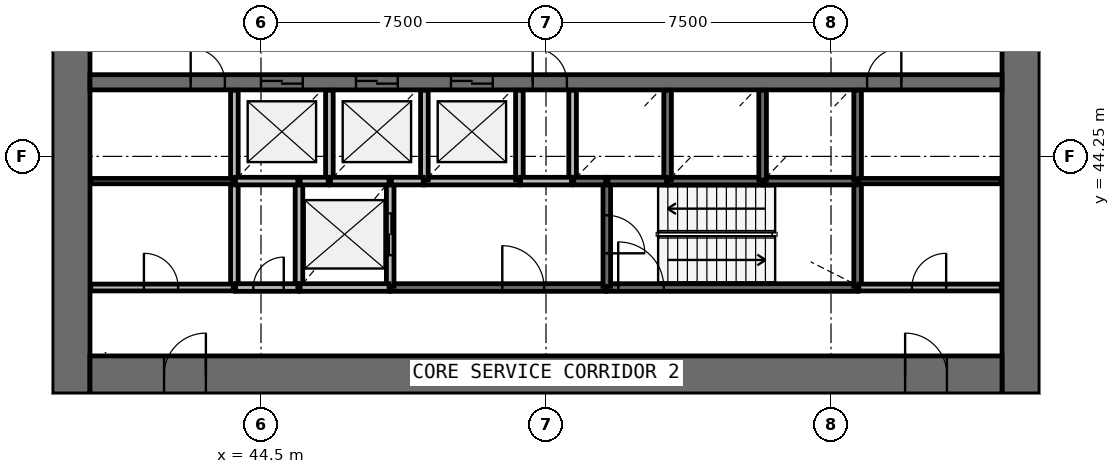
"""IFC4 building model, lengths in metres.
Left out: names, types, materials, properties, quantities, classifications, styles, units other than length and angle.
Written with IfcOpenShell. Run it as: python <this file> out.ifc"""

import sys

from ifc_helpers import new_model, si_unit, direction, frame, frame_2d, origin, place, context, subcontext, project, spatial, rectangle, extrude, source, transform, mapped, element, fill, save


model = new_model("IFC4")
c1 = context("Model", 3, precision=1e-05, world=origin(), true_north=direction((0.0, 1.0)))
c2 = subcontext(c1, "Body", "Model", "MODEL_VIEW")
j1 = project(units=[si_unit("LENGTHUNIT", "METRE"), si_unit("PLANEANGLEUNIT", "RADIAN")], contexts=[c1])
p1 = place(None, origin())
s1 = spatial("IfcSite", under=j1, at=p1, CompositionType="ELEMENT")
p2 = place(p1, origin())
s2 = spatial("IfcBuilding", under=s1, at=p2, CompositionType="ELEMENT")
p3 = place(p2, frame((0.0, 0.0, 44.6)))
s3 = spatial("IfcBuildingStorey", under=s2, at=p3, CompositionType="ELEMENT", Elevation=44.6)
p4 = place(p3, frame((64.5, 38.0, 0.0), z_axis=(0.0, 0.0, 1.0), x_axis=(0.0, 1.0, 0.0)))
e1 = element("IfcWall", 1, at=p4, inside=s3, PredefinedType="SHEAR", context=c2, shape_type="SweptSolid", body=[
    extrude(rectangle(XDim=20.0, YDim=1.0, at=frame_2d((10.0, 0.0))), origin(), (0.0, 0.0, 1.0), 4.4),
])
p5 = place(p4, frame((9.1, 0.0, 0.0)))
e2 = element("IfcOpeningElement", 2, at=p5, cuts=e1, PredefinedType="OPENING", context=c2, shape_type="SweptSolid", body=[
    extrude(rectangle(XDim=1.8, YDim=2.1, at=frame_2d((0.9, 1.05))), frame((0.0, 0.51, 0.0), z_axis=(0.0, -1.0, 0.0), x_axis=(1.0, 0.0, 0.0)), (0.0, 0.0, 1.0), 1.02),
])
p6 = place(p3, frame((39.5, 58.0, 0.0), z_axis=(0.0, 0.0, 1.0), x_axis=(0.0, -1.0, 0.0)))
e3 = element("IfcWall", 3, at=p6, inside=s3, PredefinedType="SHEAR", context=c2, shape_type="SweptSolid", body=[
    extrude(rectangle(XDim=20.0, YDim=1.0, at=frame_2d((10.0, 0.0))), origin(), (0.0, 0.0, 1.0), 4.4),
])
p7 = place(p6, frame((9.1, 0.0, 0.0)))
e4 = element("IfcOpeningElement", 4, at=p7, cuts=e3, PredefinedType="OPENING", context=c2, shape_type="SweptSolid", body=[
    extrude(rectangle(XDim=1.8, YDim=2.1, at=frame_2d((0.9, 1.05))), frame((0.0, 0.51, 0.0), z_axis=(0.0, -1.0, 0.0), x_axis=(1.0, 0.0, 0.0)), (0.0, 0.0, 1.0), 1.02),
])
p8 = place(p3, frame((40.0, 38.5, 0.0), z_axis=(0.0, 0.0, 1.0), x_axis=(1.0, 0.0, 0.0)))
e5 = element("IfcWall", 5, at=p8, inside=s3, PredefinedType="SHEAR", context=c2, shape_type="SweptSolid", body=[
    extrude(rectangle(XDim=24.0, YDim=1.0, at=frame_2d((12.0, 0.0))), origin(), (0.0, 0.0, 1.0), 4.4),
])
p9 = place(p8, frame((21.45, 0.0, 0.0)))
e6 = element("IfcOpeningElement", 6, at=p9, cuts=e5, PredefinedType="OPENING", context=c2, shape_type="SweptSolid", body=[
    extrude(rectangle(XDim=1.1, YDim=2.1, at=frame_2d((0.55, 1.05))), frame((0.0, 0.51, 0.0), z_axis=(0.0, -1.0, 0.0), x_axis=(1.0, 0.0, 0.0)), (0.0, 0.0, 1.0), 1.02),
])
p10 = place(p8, frame((1.95, 0.0, 0.0)))
e7 = element("IfcOpeningElement", 7, at=p10, cuts=e5, PredefinedType="OPENING", context=c2, shape_type="SweptSolid", body=[
    extrude(rectangle(XDim=1.1, YDim=2.1, at=frame_2d((0.55, 1.05))), frame((0.0, 0.51, 0.0), z_axis=(0.0, -1.0, 0.0), x_axis=(1.0, 0.0, 0.0)), (0.0, 0.0, 1.0), 1.02),
])
p11 = place(p3, frame((40.0, 46.2, 0.0), z_axis=(0.0, 0.0, 1.0), x_axis=(1.0, 0.0, 0.0)))
e8 = element("IfcWall", 8, at=p11, inside=s3, PredefinedType="SHEAR", context=c2, shape_type="SweptSolid", body=[
    extrude(rectangle(XDim=24.0, YDim=0.4, at=frame_2d((12.0, 0.0))), origin(), (0.0, 0.0, 1.0), 4.4),
])
p12 = place(p11, frame((4.5, 0.0, 0.0)))
e9 = element("IfcOpeningElement", 9, at=p12, cuts=e8, PredefinedType="OPENING", context=c2, shape_type="SweptSolid", body=[
    extrude(rectangle(XDim=1.1, YDim=2.1, at=frame_2d((0.55, 1.05))), frame((0.0, 0.21, 0.0), z_axis=(0.0, -1.0, 0.0), x_axis=(1.0, 0.0, 0.0)), (0.0, 0.0, 1.0), 0.42),
])
p13 = place(p11, frame((7.0, 0.0, 0.0)))
e10 = element("IfcOpeningElement", 10, at=p13, cuts=e8, PredefinedType="OPENING", context=c2, shape_type="SweptSolid", body=[
    extrude(rectangle(XDim=1.1, YDim=2.1, at=frame_2d((0.55, 1.05))), frame((0.0, 0.21, 0.0), z_axis=(0.0, -1.0, 0.0), x_axis=(1.0, 0.0, 0.0)), (0.0, 0.0, 1.0), 0.42),
])
p14 = place(p11, frame((9.5, 0.0, 0.0)))
e11 = element("IfcOpeningElement", 11, at=p14, cuts=e8, PredefinedType="OPENING", context=c2, shape_type="SweptSolid", body=[
    extrude(rectangle(XDim=1.1, YDim=2.1, at=frame_2d((0.55, 1.05))), frame((0.0, 0.21, 0.0), z_axis=(0.0, -1.0, 0.0), x_axis=(1.0, 0.0, 0.0)), (0.0, 0.0, 1.0), 0.42),
])
p15 = place(p11, frame((20.45, 0.0, 0.0)))
e12 = element("IfcOpeningElement", 12, at=p15, cuts=e8, PredefinedType="OPENING", context=c2, shape_type="SweptSolid", body=[
    extrude(rectangle(XDim=0.9, YDim=2.1, at=frame_2d((0.45, 1.05))), frame((0.0, 0.21, 0.0), z_axis=(0.0, -1.0, 0.0), x_axis=(1.0, 0.0, 0.0)), (0.0, 0.0, 1.0), 0.42),
])
p16 = place(p11, frame((2.65, 0.0, 0.0)))
e13 = element("IfcOpeningElement", 13, at=p16, cuts=e8, PredefinedType="OPENING", context=c2, shape_type="SweptSolid", body=[
    extrude(rectangle(XDim=0.9, YDim=2.1, at=frame_2d((0.45, 1.05))), frame((0.0, 0.21, 0.0), z_axis=(0.0, -1.0, 0.0), x_axis=(1.0, 0.0, 0.0)), (0.0, 0.0, 1.0), 0.42),
])
p17 = place(p11, frame((11.65, 0.0, 0.0)))
e14 = element("IfcOpeningElement", 14, at=p17, cuts=e8, PredefinedType="OPENING", context=c2, shape_type="SweptSolid", body=[
    extrude(rectangle(XDim=0.9, YDim=2.1, at=frame_2d((0.45, 1.05))), frame((0.0, 0.21, 0.0), z_axis=(0.0, -1.0, 0.0), x_axis=(1.0, 0.0, 0.0)), (0.0, 0.0, 1.0), 0.42),
])
p18 = place(p3, frame((53.6, 40.8, 0.0), z_axis=(0.0, 0.0, 1.0), x_axis=(1.0, 0.0, 0.0)))
e15 = element("IfcWall", 15, at=p18, inside=s3, PredefinedType="SOLIDWALL", context=c2, shape_type="SweptSolid", body=[
    extrude(rectangle(XDim=6.6, YDim=0.2, at=frame_2d((3.3, 0.0))), origin(), (0.0, 0.0, 1.0), 3.95),
])
p19 = place(p18, frame((0.3, 0.0, 0.0)))
e16 = element("IfcOpeningElement", 16, at=p19, cuts=e15, PredefinedType="OPENING", context=c2, shape_type="SweptSolid", body=[
    extrude(rectangle(XDim=1.2, YDim=2.1, at=frame_2d((0.6, 1.05))), frame((0.0, 0.11, 0.0), z_axis=(0.0, -1.0, 0.0), x_axis=(1.0, 0.0, 0.0)), (0.0, 0.0, 1.0), 0.22),
])
p20 = place(p3, frame((47.9, 40.8, 0.0), z_axis=(0.0, 0.0, 1.0), x_axis=(1.0, 0.0, 0.0)))
e17 = element("IfcWall", 17, at=p20, inside=s3, PredefinedType="SOLIDWALL", context=c2, shape_type="SweptSolid", body=[
    extrude(rectangle(XDim=5.67, YDim=0.2, at=frame_2d((2.835, 0.0))), origin(), (0.0, 0.0, 1.0), 3.95),
])
p21 = place(p20, frame((2.95, 0.0, 0.0)))
e18 = element("IfcOpeningElement", 18, at=p21, cuts=e17, PredefinedType="OPENING", context=c2, shape_type="SweptSolid", body=[
    extrude(rectangle(XDim=1.1, YDim=2.1, at=frame_2d((0.55, 1.05))), frame((0.0, 0.11, 0.0), z_axis=(0.0, -1.0, 0.0), x_axis=(1.0, 0.0, 0.0)), (0.0, 0.0, 1.0), 0.22),
])
for number, where, z_axis, x_axis in (
    (19, (43.8, 43.6, 0.0), (0.0, 0.0, 1.0), (0.0, -1.0, 0.0)),
    (20, (45.5, 43.6, 0.0), (0.0, 0.0, 1.0), (0.0, -1.0, 0.0)),
):
    element("IfcWall", number, at=place(p3, frame(where, z_axis=z_axis, x_axis=x_axis)), inside=s3, PredefinedType="SOLIDWALL", context=c2, shape_type="SweptSolid", body=[
        extrude(rectangle(XDim=2.8, YDim=0.2, at=frame_2d((1.4, 0.0))), origin(), (0.0, 0.0, 1.0), 3.95),
    ])
p22 = place(p3, frame((47.9, 40.83, 0.0), z_axis=(0.0, 0.0, 1.0), x_axis=(0.0, 1.0, 0.0)))
e21 = element("IfcWall", 21, at=p22, inside=s3, PredefinedType="SOLIDWALL", context=c2, shape_type="SweptSolid", body=[
    extrude(rectangle(XDim=2.77, YDim=0.2, at=frame_2d((1.385, 0.0))), origin(), (0.0, 0.0, 1.0), 3.95),
])
p23 = place(p22, frame((0.82, 0.0, 0.0)))
e22 = element("IfcOpeningElement", 22, at=p23, cuts=e21, PredefinedType="OPENING", context=c2, shape_type="SweptSolid", body=[
    extrude(rectangle(XDim=1.1, YDim=2.1, at=frame_2d((0.55, 1.05))), frame((0.0, 0.11, 0.0), z_axis=(0.0, -1.0, 0.0), x_axis=(1.0, 0.0, 0.0)), (0.0, 0.0, 1.0), 0.22),
])
p24 = place(p3, frame((60.2, 40.83, 0.0), z_axis=(0.0, 0.0, 1.0), x_axis=(0.0, 1.0, 0.0)))
e23 = element("IfcWall", 23, at=p24, inside=s3, PredefinedType="SOLIDWALL", context=c2, shape_type="SweptSolid", body=[
    extrude(rectangle(XDim=2.77, YDim=0.2, at=frame_2d((1.385, 0.0))), origin(), (0.0, 0.0, 1.0), 3.95),
])
p25 = place(p3, frame((53.6, 43.6, 0.0), z_axis=(0.0, 0.0, 1.0), x_axis=(0.0, -1.0, 0.0)))
e24 = element("IfcWall", 24, at=p25, inside=s3, PredefinedType="SOLIDWALL", context=c2, shape_type="SweptSolid", body=[
    extrude(rectangle(XDim=2.77, YDim=0.2, at=frame_2d((1.385, 0.0))), origin(), (0.0, 0.0, 1.0), 3.95),
])
p26 = place(p25, frame((0.9, 0.0, 0.0)))
e25 = element("IfcOpeningElement", 25, at=p26, cuts=e24, PredefinedType="OPENING", context=c2, shape_type="SweptSolid", body=[
    extrude(rectangle(XDim=1.0, YDim=2.1, at=frame_2d((0.5, 1.05))), frame((0.0, 0.11, 0.0), z_axis=(0.0, -1.0, 0.0), x_axis=(1.0, 0.0, 0.0)), (0.0, 0.0, 1.0), 0.22),
])
for number, where, z_axis, x_axis in (
    (26, (48.8, 43.6, 0.0), (0.0, 0.0, 1.0), (1.0, 0.0, 0.0)),
    (27, (55.2, 43.6, 0.0), (0.0, 0.0, 1.0), (1.0, 0.0, 0.0)),
):
    element("IfcWall", number, at=place(p3, frame(where, z_axis=z_axis, x_axis=x_axis)), inside=s3, PredefinedType="SOLIDWALL", context=c2, shape_type="SweptSolid", body=[
        extrude(rectangle(XDim=2.5, YDim=0.2, at=frame_2d((1.25, 0.0))), origin(), (0.0, 0.0, 1.0), 3.95),
    ])
p27 = place(p3, frame((57.73, 43.6, 0.0), z_axis=(0.0, 0.0, 1.0), x_axis=(1.0, 0.0, 0.0)))
e28 = element("IfcWall", 28, at=p27, inside=s3, PredefinedType="SOLIDWALL", context=c2, shape_type="SweptSolid", body=[
    extrude(rectangle(XDim=2.44, YDim=0.2, at=frame_2d((1.22, 0.0))), origin(), (0.0, 0.0, 1.0), 3.95),
])
p28 = place(p3, frame((45.53, 40.8, 0.0), z_axis=(0.0, 0.0, 1.0), x_axis=(1.0, 0.0, 0.0)))
e29 = element("IfcWall", 29, at=p28, inside=s3, PredefinedType="SOLIDWALL", context=c2, shape_type="SweptSolid", body=[
    extrude(rectangle(XDim=2.34, YDim=0.2, at=frame_2d((1.17, 0.0))), origin(), (0.0, 0.0, 1.0), 3.95),
])
p29 = place(p3, frame((43.8, 45.99, 0.0), z_axis=(0.0, 0.0, 1.0), x_axis=(0.0, -1.0, 0.0)))
e30 = element("IfcWall", 30, at=p29, inside=s3, PredefinedType="SOLIDWALL", context=c2, shape_type="SweptSolid", body=[
    extrude(rectangle(XDim=2.36, YDim=0.2, at=frame_2d((1.18, 0.0))), origin(), (0.0, 0.0, 1.0), 3.95),
])
p30 = place(p3, frame((46.3, 43.6, 0.0), z_axis=(0.0, 0.0, 1.0), x_axis=(0.0, 1.0, 0.0)))
e31 = element("IfcWall", 31, at=p30, inside=s3, PredefinedType="SOLIDWALL", context=c2, shape_type="SweptSolid", body=[
    extrude(rectangle(XDim=2.39, YDim=0.2, at=frame_2d((1.195, 0.0))), origin(), (0.0, 0.0, 1.0), 3.95),
])
for number, where, z_axis, x_axis in (
    (32, (48.8, 43.63, 0.0), (0.0, 0.0, 1.0), (0.0, 1.0, 0.0)),
    (33, (51.3, 43.63, 0.0), (0.0, 0.0, 1.0), (0.0, 1.0, 0.0)),
):
    element("IfcWall", number, at=place(p3, frame(where, z_axis=z_axis, x_axis=x_axis)), inside=s3, PredefinedType="SOLIDWALL", context=c2, shape_type="SweptSolid", body=[
        extrude(rectangle(XDim=2.36, YDim=0.2, at=frame_2d((1.18, 0.0))), origin(), (0.0, 0.0, 1.0), 3.95),
    ])
p31 = place(p3, frame((52.7, 45.99, 0.0), z_axis=(0.0, 0.0, 1.0), x_axis=(0.0, -1.0, 0.0)))
e34 = element("IfcWall", 34, at=p31, inside=s3, PredefinedType="SOLIDWALL", context=c2, shape_type="SweptSolid", body=[
    extrude(rectangle(XDim=2.39, YDim=0.2, at=frame_2d((1.195, 0.0))), origin(), (0.0, 0.0, 1.0), 3.95),
])
for number, where, z_axis, x_axis in (
    (35, (55.2, 43.63, 0.0), (0.0, 0.0, 1.0), (0.0, 1.0, 0.0)),
    (36, (57.7, 43.63, 0.0), (0.0, 0.0, 1.0), (0.0, 1.0, 0.0)),
    (37, (60.2, 43.63, 0.0), (0.0, 0.0, 1.0), (0.0, 1.0, 0.0)),
):
    element("IfcWall", number, at=place(p3, frame(where, z_axis=z_axis, x_axis=x_axis)), inside=s3, PredefinedType="SOLIDWALL", context=c2, shape_type="SweptSolid", body=[
        extrude(rectangle(XDim=2.36, YDim=0.2, at=frame_2d((1.18, 0.0))), origin(), (0.0, 0.0, 1.0), 3.95),
    ])
p32 = place(p3, frame((43.83, 43.6, 0.0), z_axis=(0.0, 0.0, 1.0), x_axis=(1.0, 0.0, 0.0)))
e38 = element("IfcWall", 38, at=p32, inside=s3, PredefinedType="SOLIDWALL", context=c2, shape_type="SweptSolid", body=[
    extrude(rectangle(XDim=1.64, YDim=0.2, at=frame_2d((0.82, 0.0))), origin(), (0.0, 0.0, 1.0), 3.95),
])
p33 = place(p3, frame((43.83, 40.8, 0.0), z_axis=(0.0, 0.0, 1.0), x_axis=(1.0, 0.0, 0.0)))
e39 = element("IfcWall", 39, at=p33, inside=s3, PredefinedType="SOLIDWALL", context=c2, shape_type="SweptSolid", body=[
    extrude(rectangle(XDim=1.64, YDim=0.2, at=frame_2d((0.82, 0.0))), origin(), (0.0, 0.0, 1.0), 3.95),
])
p34 = place(p33, frame((0.47, 0.0, 0.0)))
e40 = element("IfcOpeningElement", 40, at=p34, cuts=e39, PredefinedType="OPENING", context=c2, shape_type="SweptSolid", body=[
    extrude(rectangle(XDim=0.8, YDim=2.1, at=frame_2d((0.4, 1.05))), frame((0.0, 0.11, 0.0), z_axis=(0.0, -1.0, 0.0), x_axis=(1.0, 0.0, 0.0)), (0.0, 0.0, 1.0), 0.22),
])
for number, where, z_axis, x_axis in (
    (41, (46.33, 43.6, 0.0), (0.0, 0.0, 1.0), (1.0, 0.0, 0.0)),
    (42, (53.63, 43.6, 0.0), (0.0, 0.0, 1.0), (1.0, 0.0, 0.0)),
):
    element("IfcWall", number, at=place(p3, frame(where, z_axis=z_axis, x_axis=x_axis)), inside=s3, PredefinedType="SOLIDWALL", context=c2, shape_type="SweptSolid", body=[
        extrude(rectangle(XDim=1.54, YDim=0.2, at=frame_2d((0.77, 0.0))), origin(), (0.0, 0.0, 1.0), 3.95),
    ])
p35 = place(p3, frame((52.67, 43.6, 0.0), z_axis=(0.0, 0.0, 1.0), x_axis=(-1.0, 0.0, 0.0)))
e43 = element("IfcWall", 43, at=p35, inside=s3, PredefinedType="SOLIDWALL", context=c2, shape_type="SweptSolid", body=[
    extrude(rectangle(XDim=1.34, YDim=0.2, at=frame_2d((0.67, 0.0))), origin(), (0.0, 0.0, 1.0), 3.95),
])
for number, where, z_axis, x_axis in (
    (44, (47.93, 43.6, 0.0), (0.0, 0.0, 1.0), (1.0, 0.0, 0.0)),
    (45, (52.73, 43.6, 0.0), (0.0, 0.0, 1.0), (1.0, 0.0, 0.0)),
):
    element("IfcWall", number, at=place(p3, frame(where, z_axis=z_axis, x_axis=x_axis)), inside=s3, PredefinedType="SOLIDWALL", context=c2, shape_type="SweptSolid", body=[
        extrude(rectangle(XDim=0.84, YDim=0.2, at=frame_2d((0.42, 0.0))), origin(), (0.0, 0.0, 1.0), 3.95),
    ])
p36 = place(p3, frame((45.53, 43.6, 0.0), z_axis=(0.0, 0.0, 1.0), x_axis=(1.0, 0.0, 0.0)))
e46 = element("IfcWall", 46, at=p36, inside=s3, PredefinedType="SOLIDWALL", context=c2, shape_type="SweptSolid", body=[
    extrude(rectangle(XDim=0.74, YDim=0.2, at=frame_2d((0.37, 0.0))), origin(), (0.0, 0.0, 1.0), 3.95),
])
p37 = place(p3, frame((40.02, 40.8, 0.0), z_axis=(0.0, 0.0, 1.0), x_axis=(1.0, 0.0, 0.0)))
e47 = element("IfcWall", 47, at=p37, inside=s3, PredefinedType="PARTITIONING", context=c2, shape_type="SweptSolid", body=[
    extrude(rectangle(XDim=3.75, YDim=0.18, at=frame_2d((1.875, 0.0))), origin(), (0.0, 0.0, 1.0), 3.95),
])
p38 = place(p37, frame((1.4, 0.0, 0.0)))
e48 = element("IfcOpeningElement", 48, at=p38, cuts=e47, PredefinedType="OPENING", context=c2, shape_type="SweptSolid", body=[
    extrude(rectangle(XDim=0.9, YDim=2.1, at=frame_2d((0.45, 1.05))), frame((0.0, 0.1, 0.0), z_axis=(0.0, -1.0, 0.0), x_axis=(1.0, 0.0, 0.0)), (0.0, 0.0, 1.0), 0.2),
])
p39 = place(p3, frame((60.23, 40.8, 0.0), z_axis=(0.0, 0.0, 1.0), x_axis=(1.0, 0.0, 0.0)))
e49 = element("IfcWall", 49, at=p39, inside=s3, PredefinedType="PARTITIONING", context=c2, shape_type="SweptSolid", body=[
    extrude(rectangle(XDim=3.75, YDim=0.18, at=frame_2d((1.875, 0.0))), origin(), (0.0, 0.0, 1.0), 3.95),
])
p40 = place(p39, frame((1.4, 0.0, 0.0)))
e50 = element("IfcOpeningElement", 50, at=p40, cuts=e49, PredefinedType="OPENING", context=c2, shape_type="SweptSolid", body=[
    extrude(rectangle(XDim=0.9, YDim=2.1, at=frame_2d((0.45, 1.05))), frame((0.0, 0.1, 0.0), z_axis=(0.0, -1.0, 0.0), x_axis=(1.0, 0.0, 0.0)), (0.0, 0.0, 1.0), 0.2),
])
for number, where, z_axis, x_axis in (
    (51, (43.77, 43.6, 0.0), (0.0, 0.0, 1.0), (-1.0, 0.0, 0.0)),
    (52, (60.23, 43.6, 0.0), (0.0, 0.0, 1.0), (1.0, 0.0, 0.0)),
):
    element("IfcWall", number, at=place(p3, frame(where, z_axis=z_axis, x_axis=x_axis)), inside=s3, PredefinedType="PARTITIONING", context=c2, shape_type="SweptSolid", body=[
        extrude(rectangle(XDim=3.75, YDim=0.14, at=frame_2d((1.875, 0.0))), origin(), (0.0, 0.0, 1.0), 3.05),
    ])
m1 = source(origin(), c2, "Body", "SweptSolid", [
    extrude(rectangle(XDim=1.1, YDim=2.1, at=frame_2d((0.55, 1.05))), frame((0.0, 0.025, 0.0), z_axis=(0.0, -1.0, 0.0), x_axis=(1.0, 0.0, 0.0)), (0.0, 0.0, 1.0), 0.05),
])
p41 = place(p12, origin())
e53 = element("IfcDoor", 53, at=p41, inside=s3, OperationType="DOUBLE_DOOR_SLIDING", PredefinedType="USERDEFINED", context=c2, shape_type="MappedRepresentation", body=[
    mapped(m1, transform((0.0, 0.0, 0.0), scale=1.0)),
])
fill(e9, e53)
p42 = place(p13, origin())
e54 = element("IfcDoor", 54, at=p42, inside=s3, OperationType="DOUBLE_DOOR_SLIDING", PredefinedType="USERDEFINED", context=c2, shape_type="MappedRepresentation", body=[
    mapped(m1, transform((0.0, 0.0, 0.0), scale=1.0)),
])
fill(e10, e54)
p43 = place(p14, origin())
e55 = element("IfcDoor", 55, at=p43, inside=s3, OperationType="DOUBLE_DOOR_SLIDING", PredefinedType="USERDEFINED", context=c2, shape_type="MappedRepresentation", body=[
    mapped(m1, transform((0.0, 0.0, 0.0), scale=1.0)),
])
fill(e11, e55)
p44 = place(p23, origin())
e56 = element("IfcDoor", 56, at=p44, inside=s3, OperationType="DOUBLE_DOOR_SLIDING", PredefinedType="USERDEFINED", context=c2, shape_type="MappedRepresentation", body=[
    mapped(m1, transform((0.0, 0.0, 0.0), scale=1.0)),
])
fill(e22, e56)
m2 = source(origin(), c2, "Body", "SweptSolid", [
    extrude(rectangle(XDim=1.2, YDim=2.1, at=frame_2d((0.6, 1.05))), frame((0.0, 0.025, 0.0), z_axis=(0.0, -1.0, 0.0), x_axis=(1.0, 0.0, 0.0)), (0.0, 0.0, 1.0), 0.05),
])
p45 = place(p19, origin())
e57 = element("IfcDoor", 57, at=p45, inside=s3, OperationType="SINGLE_SWING_LEFT", PredefinedType="DOOR", context=c2, shape_type="MappedRepresentation", body=[
    mapped(m2, transform((0.0, 0.0, 0.0), scale=1.0)),
])
fill(e16, e57)
m3 = source(origin(), c2, "Body", "SweptSolid", [
    extrude(rectangle(XDim=1.0, YDim=2.1, at=frame_2d((0.5, 1.05))), frame((0.0, 0.025, 0.0), z_axis=(0.0, -1.0, 0.0), x_axis=(1.0, 0.0, 0.0)), (0.0, 0.0, 1.0), 0.05),
])
p46 = place(p26, origin())
e58 = element("IfcDoor", 58, at=p46, inside=s3, OperationType="SINGLE_SWING_RIGHT", PredefinedType="DOOR", context=c2, shape_type="MappedRepresentation", body=[
    mapped(m3, transform((0.0, 0.0, 0.0), scale=1.0)),
])
fill(e25, e58)
m4 = source(origin(), c2, "Body", "SweptSolid", [
    extrude(rectangle(XDim=1.1, YDim=2.1, at=frame_2d((0.55, 1.05))), frame((0.0, 0.025, 0.0), z_axis=(0.0, -1.0, 0.0), x_axis=(1.0, 0.0, 0.0)), (0.0, 0.0, 1.0), 0.05),
])
p47 = place(p21, origin())
e59 = element("IfcDoor", 59, at=p47, inside=s3, OperationType="SINGLE_SWING_LEFT", PredefinedType="DOOR", context=c2, shape_type="MappedRepresentation", body=[
    mapped(m4, transform((0.0, 0.0, 0.0), scale=1.0)),
])
fill(e18, e59)
m5 = source(origin(), c2, "Body", "SweptSolid", [
    extrude(rectangle(XDim=0.8, YDim=2.1, at=frame_2d((0.4, 1.05))), frame((0.0, 0.025, 0.0), z_axis=(0.0, -1.0, 0.0), x_axis=(1.0, 0.0, 0.0)), (0.0, 0.0, 1.0), 0.05),
])
p48 = place(p34, origin())
e60 = element("IfcDoor", 60, at=p48, inside=s3, OperationType="SINGLE_SWING_RIGHT", PredefinedType="DOOR", context=c2, shape_type="MappedRepresentation", body=[
    mapped(m5, transform((0.0, 0.0, 0.0), scale=1.0)),
])
fill(e40, e60)
m6 = source(origin(), c2, "Body", "SweptSolid", [
    extrude(rectangle(XDim=1.1, YDim=2.1, at=frame_2d((0.55, 1.05))), frame((0.0, 0.025, 0.0), z_axis=(0.0, -1.0, 0.0), x_axis=(1.0, 0.0, 0.0)), (0.0, 0.0, 1.0), 0.05),
])
p49 = place(p9, origin())
e61 = element("IfcDoor", 61, at=p49, inside=s3, OperationType="SINGLE_SWING_LEFT", PredefinedType="DOOR", context=c2, shape_type="MappedRepresentation", body=[
    mapped(m6, transform((0.0, 0.0, 0.0), scale=1.0)),
])
fill(e6, e61)
p50 = place(p10, origin())
e62 = element("IfcDoor", 62, at=p50, inside=s3, OperationType="SINGLE_SWING_RIGHT", PredefinedType="DOOR", context=c2, shape_type="MappedRepresentation", body=[
    mapped(m6, transform((0.0, 0.0, 0.0), scale=1.0)),
])
fill(e7, e62)
m7 = source(origin(), c2, "Body", "SweptSolid", [
    extrude(rectangle(XDim=0.9, YDim=2.1, at=frame_2d((0.45, 1.05))), frame((0.0, 0.025, 0.0), z_axis=(0.0, -1.0, 0.0), x_axis=(1.0, 0.0, 0.0)), (0.0, 0.0, 1.0), 0.05),
])
p51 = place(p38, origin())
e63 = element("IfcDoor", 63, at=p51, inside=s3, OperationType="SINGLE_SWING_LEFT", PredefinedType="DOOR", context=c2, shape_type="MappedRepresentation", body=[
    mapped(m7, transform((0.0, 0.0, 0.0), scale=1.0)),
])
fill(e48, e63)
p52 = place(p15, origin())
e64 = element("IfcDoor", 64, at=p52, inside=s3, OperationType="SINGLE_SWING_RIGHT", PredefinedType="DOOR", context=c2, shape_type="MappedRepresentation", body=[
    mapped(m7, transform((0.0, 0.0, 0.0), scale=1.0)),
])
fill(e12, e64)
p53 = place(p40, origin())
e65 = element("IfcDoor", 65, at=p53, inside=s3, OperationType="SINGLE_SWING_RIGHT", PredefinedType="DOOR", context=c2, shape_type="MappedRepresentation", body=[
    mapped(m7, transform((0.0, 0.0, 0.0), scale=1.0)),
])
fill(e50, e65)
p54 = place(p16, origin())
e66 = element("IfcDoor", 66, at=p54, inside=s3, OperationType="SINGLE_SWING_LEFT", PredefinedType="DOOR", context=c2, shape_type="MappedRepresentation", body=[
    mapped(m7, transform((0.0, 0.0, 0.0), scale=1.0)),
])
fill(e13, e66)
p55 = place(p17, origin())
e67 = element("IfcDoor", 67, at=p55, inside=s3, OperationType="SINGLE_SWING_LEFT", PredefinedType="DOOR", context=c2, shape_type="MappedRepresentation", body=[
    mapped(m7, transform((0.0, 0.0, 0.0), scale=1.0)),
])
fill(e14, e67)
save(model, sys.argv[1])
